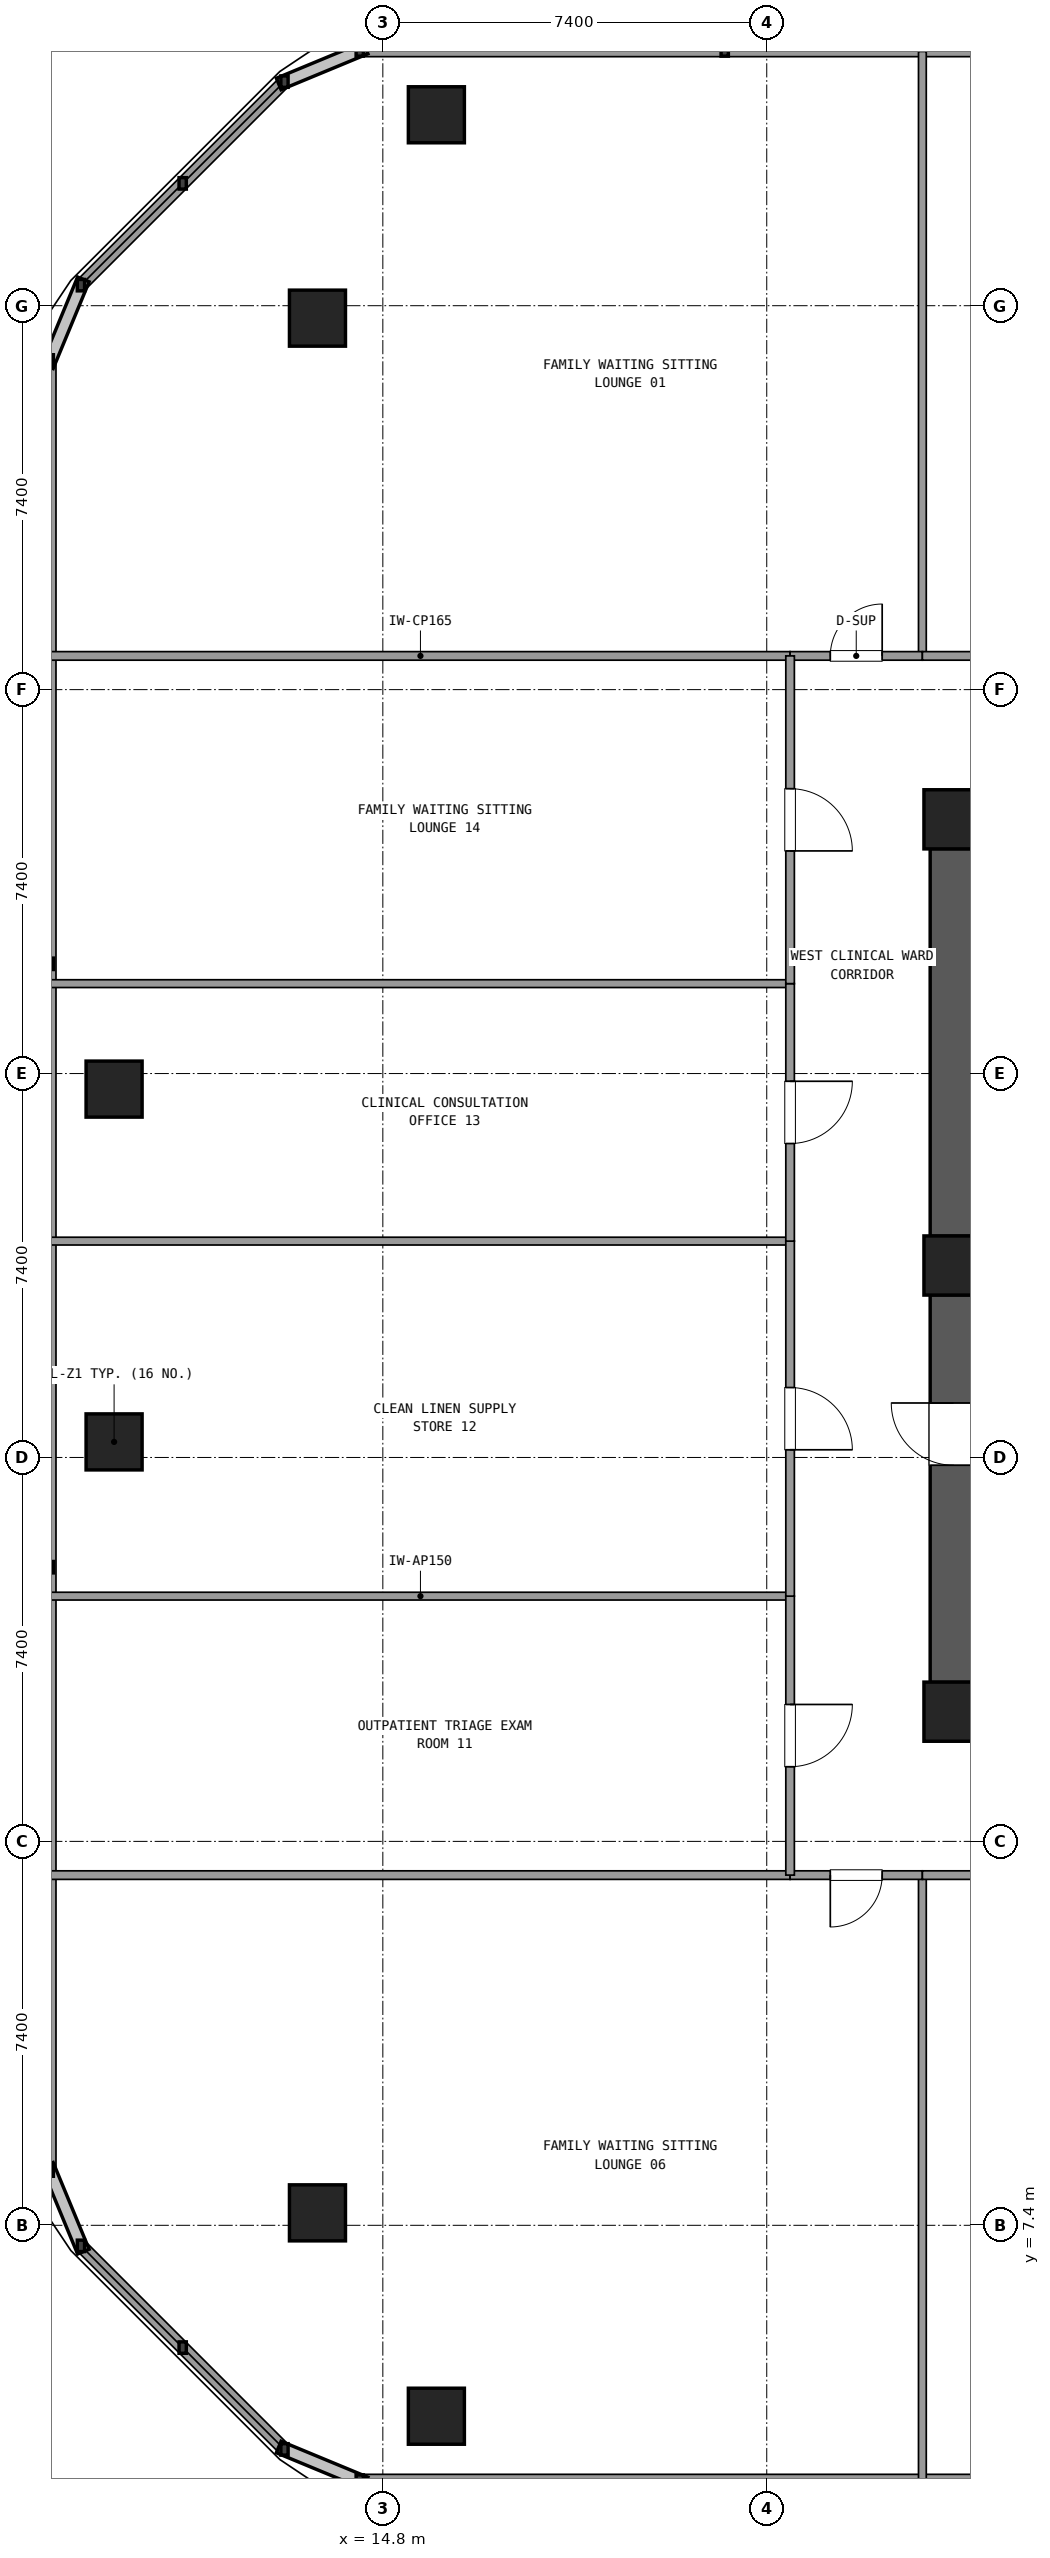
"""IFC4 building model, lengths in metres.
Left out: names, types, materials, properties, quantities, classifications, styles, units other than length and angle.
Written with IfcOpenShell. Run it as: python <this file> out.ifc"""

import sys

from ifc_helpers import new_model, si_unit, direction, frame, frame_2d, origin, origin_2d, place, context, subcontext, project, spatial, rectangle, extrude, element, fill, save


model = new_model("IFC4")
c1 = context("Model", 3, precision=1e-05, world=origin(), true_north=direction((0.0, 1.0)))
c2 = subcontext(c1, "Body", "Model", "MODEL_VIEW")
j1 = project(units=[si_unit("LENGTHUNIT", "METRE"), si_unit("PLANEANGLEUNIT", "RADIAN")], contexts=[c1])
p1 = place(None, origin())
s1 = spatial("IfcSite", under=j1, at=p1, CompositionType="ELEMENT")
p2 = place(p1, origin())
s2 = spatial("IfcBuilding", under=s1, at=p2, CompositionType="ELEMENT")
p3 = place(p2, frame((0.0, 0.0, 45.54)))
s3 = spatial("IfcBuildingStorey", under=s2, at=p3, CompositionType="ELEMENT", Elevation=45.54)
for number, where, z_axis, x_axis in (
    (1, (25.8, 17.3, 0.0), (0.0, 0.0, 1.0), (1.0, 0.0, 0.0)),
    (2, (25.8, 34.5, 0.0), (0.0, 0.0, 1.0), (1.0, 0.0, 0.0)),
    (3, (25.8, 25.9, 0.0), (0.0, 0.0, 1.0), (1.0, 0.0, 0.0)),
):
    element("IfcColumn", number, at=place(p3, frame(where, z_axis=z_axis, x_axis=x_axis)), inside=s3, PredefinedType="COLUMN", context=c2, shape_type="SweptSolid", body=[
        extrude(rectangle(XDim=1.14, YDim=1.14, at=origin_2d()), origin(), (0.0, 0.0, 1.0), 3.6),
    ])
p4 = place(p3, frame((25.8, 33.935, 0.0), z_axis=(0.0, 0.0, 1.0), x_axis=(0.0, -1.0, 0.0)))
e4 = element("IfcWall", 4, at=p4, inside=s3, PredefinedType="SHEAR", context=c2, shape_type="SweptSolid", body=[
    extrude(rectangle(XDim=7.47, YDim=0.9, at=frame_2d((3.735, 0.0))), origin(), (0.0, 0.0, 1.0), 3.32),
])
p5 = place(p3, frame((25.8, 25.335, 0.0), z_axis=(0.0, 0.0, 1.0), x_axis=(0.0, -1.0, 0.0)))
e5 = element("IfcWall", 5, at=p5, inside=s3, PredefinedType="SHEAR", context=c2, shape_type="SweptSolid", body=[
    extrude(rectangle(XDim=7.47, YDim=0.9, at=frame_2d((3.735, 0.0))), origin(), (0.0, 0.0, 1.0), 3.32),
])
p6 = place(p5, frame((2.085, 0.0, 0.0)))
e6 = element("IfcOpeningElement", 6, at=p6, cuts=e5, PredefinedType="OPENING", context=c2, shape_type="SweptSolid", body=[
    extrude(rectangle(XDim=1.2, YDim=2.15, at=frame_2d((0.6, 1.075))), frame((0.0, 0.46, 0.0), z_axis=(0.0, -1.0, 0.0), x_axis=(1.0, 0.0, 0.0)), (0.0, 0.0, 1.0), 0.92),
])
for number, where, z_axis, x_axis in (
    (7, (9.62, 22.5, 0.0), (0.0, 0.0, 1.0), (1.0, 0.0, 0.0)),
    (8, (13.54, 7.64, 0.0), (0.0, 0.0, 1.0), (1.0, 0.0, 0.0)),
    (9, (15.832, 3.72, 0.0), (0.0, 0.0, 1.0), (1.0, 0.0, 0.0)),
    (10, (15.832, 48.08, 0.0), (0.0, 0.0, 1.0), (1.0, 0.0, 0.0)),
    (11, (13.54, 44.16, 0.0), (0.0, 0.0, 1.0), (1.0, 0.0, 0.0)),
    (12, (9.62, 29.3, 0.0), (0.0, 0.0, 1.0), (1.0, 0.0, 0.0)),
):
    element("IfcColumn", number, at=place(p3, frame(where, z_axis=z_axis, x_axis=x_axis)), inside=s3, PredefinedType="COLUMN", context=c2, shape_type="SweptSolid", body=[
        extrude(rectangle(XDim=1.08, YDim=1.08, at=origin_2d()), origin(), (0.0, 0.0, 1.0), 3.6),
    ])
p7 = place(p3, frame((14.355, 2.48, 0.0), z_axis=(0.0, 0.0, 1.0), x_axis=(1.0, 0.0, 0.0)))
e13 = element("IfcWall", 13, at=p7, inside=s3, PredefinedType="SOLIDWALL", context=c2, shape_type="SweptSolid", body=[
    extrude(rectangle(XDim=45.29, YDim=0.24, at=frame_2d((22.645, 0.0))), origin(), (0.0, 0.0, 1.0), 0.85),
])
p8 = place(p3, frame((35.46, 49.32, 0.0), z_axis=(0.0, 0.0, 1.0), x_axis=(-1.0, 0.0, 0.0)))
e14 = element("IfcWall", 14, at=p8, inside=s3, PredefinedType="SOLIDWALL", context=c2, shape_type="SweptSolid", body=[
    extrude(rectangle(XDim=21.105, YDim=0.24, at=frame_2d((10.552, 0.0))), origin(), (0.0, 0.0, 1.0), 0.85),
])
p9 = place(p3, frame((12.904, 48.719, 0.0), z_axis=(0.0, 0.0, 1.0), x_axis=(-0.707106781187, -0.707106781187, 0.0)))
e15 = element("IfcWall", 15, at=p9, inside=s3, PredefinedType="SOLIDWALL", context=c2, shape_type="SweptSolid", body=[
    extrude(rectangle(XDim=5.548, YDim=0.24, at=frame_2d((2.774, 0.0))), origin(), (0.0, 0.0, 1.0), 0.85),
])
p10 = place(p3, frame((8.38, 43.345, 0.0), z_axis=(0.0, 0.0, 1.0), x_axis=(0.0, -1.0, 0.0)))
e16 = element("IfcWall", 16, at=p10, inside=s3, PredefinedType="SOLIDWALL", context=c2, shape_type="SweptSolid", body=[
    extrude(rectangle(XDim=34.89, YDim=0.24, at=frame_2d((17.445, 0.0))), origin(), (0.0, 0.0, 1.0), 0.85),
])
p11 = place(p3, frame((8.981, 7.004, 0.0), z_axis=(0.0, 0.0, 1.0), x_axis=(0.707128783731, -0.707084777957, 0.0)))
e17 = element("IfcWall", 17, at=p11, inside=s3, PredefinedType="SOLIDWALL", context=c2, shape_type="SweptSolid", body=[
    extrude(rectangle(XDim=5.548, YDim=0.24, at=frame_2d((2.774, 0.0))), origin(), (0.0, 0.0, 1.0), 0.85),
])
for number, where, z_axis, x_axis in (
    (18, (8.4, 37.65, 0.0), (0.0, 0.0, 1.0), (1.0, 0.0, 0.0)),
    (19, (8.4, 14.15, 0.0), (0.0, 0.0, 1.0), (1.0, 0.0, 0.0)),
):
    element("IfcWall", number, at=place(p3, frame(where, z_axis=z_axis, x_axis=x_axis)), inside=s3, PredefinedType="PARTITIONING", context=c2, shape_type="SweptSolid", body=[
        extrude(rectangle(XDim=14.25, YDim=0.165, at=frame_2d((7.125, 0.0))), origin(), (0.0, 0.0, 1.0), 2.61),
    ])
p12 = place(p3, frame((25.2, 37.65, 0.0), z_axis=(0.0, 0.0, 1.0), x_axis=(0.0, 1.0, 0.0)))
e20 = element("IfcWall", 20, at=p12, inside=s3, PredefinedType="PARTITIONING", context=c2, shape_type="SweptSolid", body=[
    extrude(rectangle(XDim=11.65, YDim=0.15, at=frame_2d((5.825, 0.0))), origin(), (0.0, 0.0, 1.0), 2.61),
])
p13 = place(p3, frame((22.65, 37.65, 0.0), z_axis=(0.0, 0.0, 1.0), x_axis=(1.0, 0.0, 0.0)))
e21 = element("IfcWall", 21, at=p13, inside=s3, PredefinedType="PARTITIONING", context=c2, shape_type="SweptSolid", body=[
    extrude(rectangle(XDim=2.55, YDim=0.165, at=frame_2d((1.275, 0.0))), origin(), (0.0, 0.0, 1.0), 2.61),
])
p14 = place(p13, frame((0.775, 0.0, 0.0)))
e22 = element("IfcOpeningElement", 22, at=p14, cuts=e21, PredefinedType="OPENING", context=c2, shape_type="SweptSolid", body=[
    extrude(rectangle(XDim=1.0, YDim=2.15, at=frame_2d((0.5, 1.075))), frame((0.0, 0.093, 0.0), z_axis=(0.0, -1.0, 0.0), x_axis=(1.0, 0.0, 0.0)), (0.0, 0.0, 1.0), 0.185),
])
p15 = place(p3, frame((25.2, 37.65, 0.0), z_axis=(0.0, 0.0, 1.0), x_axis=(1.0, 0.0, 0.0)))
e23 = element("IfcWall", 23, at=p15, inside=s3, PredefinedType="PARTITIONING", context=c2, shape_type="SweptSolid", body=[
    extrude(rectangle(XDim=10.0, YDim=0.165, at=frame_2d((5.0, 0.0))), origin(), (0.0, 0.0, 1.0), 2.61),
])
p16 = place(p15, frame((4.4, 0.0, 0.0)))
e24 = element("IfcOpeningElement", 24, at=p16, cuts=e23, PredefinedType="OPENING", context=c2, shape_type="SweptSolid", body=[
    extrude(rectangle(XDim=1.2, YDim=2.15, at=frame_2d((0.6, 1.075))), frame((0.0, 0.093, 0.0), z_axis=(0.0, -1.0, 0.0), x_axis=(1.0, 0.0, 0.0)), (0.0, 0.0, 1.0), 0.185),
])
p17 = place(p3, frame((25.2, 14.15, 0.0), z_axis=(0.0, 0.0, 1.0), x_axis=(0.0, -1.0, 0.0)))
e25 = element("IfcWall", 25, at=p17, inside=s3, PredefinedType="PARTITIONING", context=c2, shape_type="SweptSolid", body=[
    extrude(rectangle(XDim=11.65, YDim=0.15, at=frame_2d((5.825, 0.0))), origin(), (0.0, 0.0, 1.0), 2.61),
])
p18 = place(p3, frame((22.65, 14.15, 0.0), z_axis=(0.0, 0.0, 1.0), x_axis=(1.0, 0.0, 0.0)))
e26 = element("IfcWall", 26, at=p18, inside=s3, PredefinedType="PARTITIONING", context=c2, shape_type="SweptSolid", body=[
    extrude(rectangle(XDim=2.55, YDim=0.165, at=frame_2d((1.275, 0.0))), origin(), (0.0, 0.0, 1.0), 2.61),
])
p19 = place(p18, frame((0.775, 0.0, 0.0)))
e27 = element("IfcOpeningElement", 27, at=p19, cuts=e26, PredefinedType="OPENING", context=c2, shape_type="SweptSolid", body=[
    extrude(rectangle(XDim=1.0, YDim=2.15, at=frame_2d((0.5, 1.075))), frame((0.0, 0.093, 0.0), z_axis=(0.0, -1.0, 0.0), x_axis=(1.0, 0.0, 0.0)), (0.0, 0.0, 1.0), 0.185),
])
p20 = place(p3, frame((25.2, 14.15, 0.0), z_axis=(0.0, 0.0, 1.0), x_axis=(1.0, 0.0, 0.0)))
e28 = element("IfcWall", 28, at=p20, inside=s3, PredefinedType="PARTITIONING", context=c2, shape_type="SweptSolid", body=[
    extrude(rectangle(XDim=6.836, YDim=0.165, at=frame_2d((3.418, 0.0))), origin(), (0.0, 0.0, 1.0), 2.61),
])
p21 = place(p20, frame((2.818, 0.0, 0.0)))
e29 = element("IfcOpeningElement", 29, at=p21, cuts=e28, PredefinedType="OPENING", context=c2, shape_type="SweptSolid", body=[
    extrude(rectangle(XDim=1.2, YDim=2.15, at=frame_2d((0.6, 1.075))), frame((0.0, 0.093, 0.0), z_axis=(0.0, -1.0, 0.0), x_axis=(1.0, 0.0, 0.0)), (0.0, 0.0, 1.0), 0.185),
])
p22 = place(p3, frame((22.65, 19.527, 0.0), z_axis=(0.0, 0.0, 1.0), x_axis=(-1.0, 0.0, 0.0)))
e30 = element("IfcWall", 30, at=p22, inside=s3, PredefinedType="PARTITIONING", context=c2, shape_type="SweptSolid", body=[
    extrude(rectangle(XDim=14.25, YDim=0.15, at=frame_2d((7.125, 0.0))), origin(), (0.0, 0.0, 1.0), 2.61),
])
p23 = place(p3, frame((22.65, 14.15, 0.0), z_axis=(0.0, 0.0, 1.0), x_axis=(0.0, 1.0, 0.0)))
e31 = element("IfcWall", 31, at=p23, inside=s3, PredefinedType="PARTITIONING", context=c2, shape_type="SweptSolid", body=[
    extrude(rectangle(XDim=5.377, YDim=0.165, at=frame_2d((2.688, 0.0))), origin(), (0.0, 0.0, 1.0), 2.61),
])
p24 = place(p23, frame((2.089, 0.0, 0.0)))
e32 = element("IfcOpeningElement", 32, at=p24, cuts=e31, PredefinedType="OPENING", context=c2, shape_type="SweptSolid", body=[
    extrude(rectangle(XDim=1.2, YDim=2.15, at=frame_2d((0.6, 1.075))), frame((0.0, 0.093, 0.0), z_axis=(0.0, -1.0, 0.0), x_axis=(1.0, 0.0, 0.0)), (0.0, 0.0, 1.0), 0.185),
])
p25 = place(p3, frame((22.65, 26.37, 0.0), z_axis=(0.0, 0.0, 1.0), x_axis=(-1.0, 0.0, 0.0)))
e33 = element("IfcWall", 33, at=p25, inside=s3, PredefinedType="PARTITIONING", context=c2, shape_type="SweptSolid", body=[
    extrude(rectangle(XDim=14.25, YDim=0.15, at=frame_2d((7.125, 0.0))), origin(), (0.0, 0.0, 1.0), 2.61),
])
p26 = place(p3, frame((22.65, 19.527, 0.0), z_axis=(0.0, 0.0, 1.0), x_axis=(0.0, 1.0, 0.0)))
e34 = element("IfcWall", 34, at=p26, inside=s3, PredefinedType="PARTITIONING", context=c2, shape_type="SweptSolid", body=[
    extrude(rectangle(XDim=6.843, YDim=0.165, at=frame_2d((3.421, 0.0))), origin(), (0.0, 0.0, 1.0), 2.61),
])
p27 = place(p26, frame((2.821, 0.0, 0.0)))
e35 = element("IfcOpeningElement", 35, at=p27, cuts=e34, PredefinedType="OPENING", context=c2, shape_type="SweptSolid", body=[
    extrude(rectangle(XDim=1.2, YDim=2.15, at=frame_2d((0.6, 1.075))), frame((0.0, 0.093, 0.0), z_axis=(0.0, -1.0, 0.0), x_axis=(1.0, 0.0, 0.0)), (0.0, 0.0, 1.0), 0.185),
])
p28 = place(p3, frame((22.65, 31.333, 0.0), z_axis=(0.0, 0.0, 1.0), x_axis=(-1.0, 0.0, 0.0)))
e36 = element("IfcWall", 36, at=p28, inside=s3, PredefinedType="PARTITIONING", context=c2, shape_type="SweptSolid", body=[
    extrude(rectangle(XDim=14.25, YDim=0.15, at=frame_2d((7.125, 0.0))), origin(), (0.0, 0.0, 1.0), 2.61),
])
p29 = place(p3, frame((22.65, 26.37, 0.0), z_axis=(0.0, 0.0, 1.0), x_axis=(0.0, 1.0, 0.0)))
e37 = element("IfcWall", 37, at=p29, inside=s3, PredefinedType="PARTITIONING", context=c2, shape_type="SweptSolid", body=[
    extrude(rectangle(XDim=4.963, YDim=0.165, at=frame_2d((2.481, 0.0))), origin(), (0.0, 0.0, 1.0), 2.61),
])
p30 = place(p29, frame((1.881, 0.0, 0.0)))
e38 = element("IfcOpeningElement", 38, at=p30, cuts=e37, PredefinedType="OPENING", context=c2, shape_type="SweptSolid", body=[
    extrude(rectangle(XDim=1.2, YDim=2.15, at=frame_2d((0.6, 1.075))), frame((0.0, 0.093, 0.0), z_axis=(0.0, -1.0, 0.0), x_axis=(1.0, 0.0, 0.0)), (0.0, 0.0, 1.0), 0.185),
])
p31 = place(p3, frame((22.65, 31.333, 0.0), z_axis=(0.0, 0.0, 1.0), x_axis=(0.0, 1.0, 0.0)))
e39 = element("IfcWall", 39, at=p31, inside=s3, PredefinedType="PARTITIONING", context=c2, shape_type="SweptSolid", body=[
    extrude(rectangle(XDim=6.317, YDim=0.165, at=frame_2d((3.158, 0.0))), origin(), (0.0, 0.0, 1.0), 2.61),
])
p32 = place(p31, frame((2.558, 0.0, 0.0)))
e40 = element("IfcOpeningElement", 40, at=p32, cuts=e39, PredefinedType="OPENING", context=c2, shape_type="SweptSolid", body=[
    extrude(rectangle(XDim=1.2, YDim=2.15, at=frame_2d((0.6, 1.075))), frame((0.0, 0.093, 0.0), z_axis=(0.0, -1.0, 0.0), x_axis=(1.0, 0.0, 0.0)), (0.0, 0.0, 1.0), 0.185),
])
p33 = place(p6, frame((1.2, 0.0, 0.0), z_axis=(0.0, 0.0, 1.0), x_axis=(-1.0, 0.0, 0.0)))
e41 = element("IfcDoor", 41, at=p33, inside=s3, OperationType="SINGLE_SWING_LEFT", PredefinedType="DOOR", context=c2, shape_type="SweptSolid", body=[
    extrude(rectangle(XDim=1.2, YDim=2.15, at=frame_2d((0.6, 1.075))), frame((0.0, 0.025, 0.0), z_axis=(0.0, -1.0, 0.0), x_axis=(1.0, 0.0, 0.0)), (0.0, 0.0, 1.0), 0.05),
])
fill(e6, e41)
p34 = place(p14, origin())
e42 = element("IfcDoor", 42, at=p34, inside=s3, OperationType="SINGLE_SWING_RIGHT", PredefinedType="DOOR", context=c2, shape_type="SweptSolid", body=[
    extrude(rectangle(XDim=1.0, YDim=2.15, at=frame_2d((0.5, 1.075))), frame((0.0, 0.025, 0.0), z_axis=(0.0, -1.0, 0.0), x_axis=(1.0, 0.0, 0.0)), (0.0, 0.0, 1.0), 0.05),
])
fill(e22, e42)
p35 = place(p19, frame((1.0, 0.0, 0.0), z_axis=(0.0, 0.0, 1.0), x_axis=(-1.0, 0.0, 0.0)))
e43 = element("IfcDoor", 43, at=p35, inside=s3, OperationType="SINGLE_SWING_LEFT", PredefinedType="DOOR", context=c2, shape_type="SweptSolid", body=[
    extrude(rectangle(XDim=1.0, YDim=2.15, at=frame_2d((0.5, 1.075))), frame((0.0, 0.025, 0.0), z_axis=(0.0, -1.0, 0.0), x_axis=(1.0, 0.0, 0.0)), (0.0, 0.0, 1.0), 0.05),
])
fill(e27, e43)
p36 = place(p24, frame((1.2, 0.0, 0.0), z_axis=(0.0, 0.0, 1.0), x_axis=(-1.0, 0.0, 0.0)))
e44 = element("IfcDoor", 44, at=p36, inside=s3, OperationType="SINGLE_SWING_RIGHT", PredefinedType="DOOR", context=c2, shape_type="SweptSolid", body=[
    extrude(rectangle(XDim=1.2, YDim=2.15, at=frame_2d((0.6, 1.075))), frame((0.0, 0.025, 0.0), z_axis=(0.0, -1.0, 0.0), x_axis=(1.0, 0.0, 0.0)), (0.0, 0.0, 1.0), 0.05),
])
fill(e32, e44)
p37 = place(p27, frame((1.2, 0.0, 0.0), z_axis=(0.0, 0.0, 1.0), x_axis=(-1.0, 0.0, 0.0)))
e45 = element("IfcDoor", 45, at=p37, inside=s3, OperationType="SINGLE_SWING_LEFT", PredefinedType="DOOR", context=c2, shape_type="SweptSolid", body=[
    extrude(rectangle(XDim=1.2, YDim=2.15, at=frame_2d((0.6, 1.075))), frame((0.0, 0.025, 0.0), z_axis=(0.0, -1.0, 0.0), x_axis=(1.0, 0.0, 0.0)), (0.0, 0.0, 1.0), 0.05),
])
fill(e35, e45)
p38 = place(p30, frame((1.2, 0.0, 0.0), z_axis=(0.0, 0.0, 1.0), x_axis=(-1.0, 0.0, 0.0)))
e46 = element("IfcDoor", 46, at=p38, inside=s3, OperationType="SINGLE_SWING_RIGHT", PredefinedType="DOOR", context=c2, shape_type="SweptSolid", body=[
    extrude(rectangle(XDim=1.2, YDim=2.15, at=frame_2d((0.6, 1.075))), frame((0.0, 0.025, 0.0), z_axis=(0.0, -1.0, 0.0), x_axis=(1.0, 0.0, 0.0)), (0.0, 0.0, 1.0), 0.05),
])
fill(e38, e46)
p39 = place(p32, frame((1.2, 0.0, 0.0), z_axis=(0.0, 0.0, 1.0), x_axis=(-1.0, 0.0, 0.0)))
e47 = element("IfcDoor", 47, at=p39, inside=s3, OperationType="SINGLE_SWING_LEFT", PredefinedType="DOOR", context=c2, shape_type="SweptSolid", body=[
    extrude(rectangle(XDim=1.2, YDim=2.15, at=frame_2d((0.6, 1.075))), frame((0.0, 0.025, 0.0), z_axis=(0.0, -1.0, 0.0), x_axis=(1.0, 0.0, 0.0)), (0.0, 0.0, 1.0), 0.05),
])
fill(e40, e47)
save(model, sys.argv[1])
